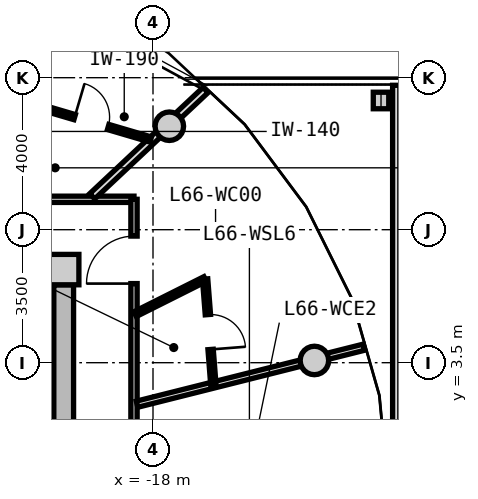
"""IFC4 building model, lengths in metres.
Left out: names, types, materials, properties, quantities, classifications, styles, units other than length and angle.
Written with IfcOpenShell. Run it as: python <this file> out.ifc"""

import sys

from ifc_helpers import new_model, si_unit, direction, frame, frame_2d, origin, origin_2d, place, context, subcontext, project, spatial, rectangle, circle, i_section, extrude, source, transform, mapped, element, fill, save


model = new_model("IFC4")
c1 = context("Model", 3, precision=1e-05, world=origin(), true_north=direction((0.0, 1.0)))
c2 = subcontext(c1, "Body", "Model", "MODEL_VIEW")
j1 = project(units=[si_unit("LENGTHUNIT", "METRE"), si_unit("PLANEANGLEUNIT", "RADIAN")], contexts=[c1])
p1 = place(None, origin())
s1 = spatial("IfcSite", under=j1, at=p1, CompositionType="ELEMENT")
p2 = place(p1, origin())
s2 = spatial("IfcBuilding", under=s1, at=p2, CompositionType="ELEMENT")
p3 = place(p2, frame((0.0, 0.0, 213.9)))
s3 = spatial("IfcBuildingStorey", under=s2, at=p3, CompositionType="ELEMENT", Elevation=213.9)
m1 = source(origin(), c2, "Body", "SweptSolid", [
    extrude(rectangle(XDim=0.8, YDim=0.8, at=origin_2d()), origin(), (0.0, 0.0, 1.0), 3.05),
])
p4 = place(p3, frame((-20.35, 5.95, 0.0), z_axis=(0.0, 0.0, 1.0), x_axis=(1.0, 0.0, 0.0)))
e1 = element("IfcColumn", 1, at=p4, inside=s3, PredefinedType="COLUMN", context=c2, shape_type="MappedRepresentation", body=[
    mapped(m1, transform((0.0, 0.0, 0.0), x_axis=(1.0, 0.0, 0.0), y_axis=(0.0, 1.0, 0.0), z_axis=(0.0, 0.0, 1.0), scale=1.0)),
])
m2 = source(origin(), c2, "Body", "SweptSolid", [
    extrude(rectangle(XDim=11.1, YDim=0.52, at=frame_2d((5.55, 0.0))), origin(), (0.0, 0.0, 1.0), 2.76),
])
p5 = place(p3, frame((-20.35, 5.55, 0.0), z_axis=(0.0, 0.0, 1.0), x_axis=(0.0, -1.0, 0.0)))
e2 = element("IfcWall", 2, at=p5, inside=s3, PredefinedType="SHEAR", context=c2, shape_type="MappedRepresentation", body=[
    mapped(m2, transform((0.0, 0.0, 0.0), x_axis=(1.0, 0.0, 0.0), y_axis=(0.0, 1.0, 0.0), z_axis=(0.0, 0.0, 1.0), scale=1.0)),
])
p6 = place(p5, frame((5.65, 0.0, 0.0)))
e3 = element("IfcOpeningElement", 3, at=p6, cuts=e2, PredefinedType="OPENING", context=c2, shape_type="SweptSolid", body=[
    extrude(rectangle(XDim=1.2, YDim=2.15, at=frame_2d((0.6, 1.075))), frame((0.0, 0.27, 0.0), z_axis=(0.0, -1.0, 0.0), x_axis=(1.0, 0.0, 0.0)), (0.0, 0.0, 1.0), 0.54),
])
m3 = source(origin(), c2, "Body", "SweptSolid", [
    extrude(circle(Radius=0.375, at=origin_2d()), origin(), (0.0, 0.0, 1.0), 3.05),
])
for number, where, z_axis, x_axis in (
    (4, (-13.753, 3.559, 0.0), (0.0, 0.0, 1.0), (1.0, 0.0, 0.0)),
    (5, (-17.57, 9.723, 0.0), (0.0, 0.0, 1.0), (1.0, 0.0, 0.0)),
):
    element("IfcColumn", number, at=place(p3, frame(where, z_axis=z_axis, x_axis=x_axis)), inside=s3, PredefinedType="COLUMN", context=c2, shape_type="MappedRepresentation", body=[
        mapped(m3, transform((0.0, 0.0, 0.0), x_axis=(1.0, 0.0, 0.0), y_axis=(0.0, 1.0, 0.0), z_axis=(0.0, 0.0, 1.0), scale=1.0)),
    ])
m4 = source(origin(), c2, "Body", "SweptSolid", [
    extrude(i_section(OverallWidth=0.407, OverallDepth=0.435, WebThickness=0.024, FlangeThickness=0.039, FilletRadius=0.015, at=origin_2d()), origin(), (0.0, 0.0, 1.0), 3.05),
])
p7 = place(p3, frame((-12.0, 10.4, 0.0), z_axis=(0.0, 0.0, 1.0), x_axis=(1.0, 0.0, 0.0)))
e6 = element("IfcColumn", 6, at=p7, inside=s3, PredefinedType="COLUMN", context=c2, shape_type="MappedRepresentation", body=[
    mapped(m4, transform((0.0, 0.0, 0.0), x_axis=(1.0, 0.0, 0.0), y_axis=(0.0, 1.0, 0.0), z_axis=(0.0, 0.0, 1.0), scale=1.0)),
])
m5 = source(origin(), c2, "Body", "SweptSolid", [
    extrude(rectangle(XDim=8.58, YDim=0.165, at=frame_2d((4.29, 0.0))), origin(), (0.0, 0.0, 1.0), 2.745),
])
p8 = place(p3, frame((-27.08, 7.8, 0.0), z_axis=(0.0, 0.0, 1.0), x_axis=(1.0, 0.0, 0.0)))
e7 = element("IfcWall", 7, at=p8, inside=s3, PredefinedType="PARTITIONING", context=c2, shape_type="MappedRepresentation", body=[
    mapped(m5, transform((0.0, 0.0, 0.0), x_axis=(1.0, 0.0, 0.0), y_axis=(0.0, 1.0, 0.0), z_axis=(0.0, 0.0, 1.0), scale=1.0)),
])
p9 = place(p8, frame((2.18, 0.0, 0.0)))
e8 = element("IfcOpeningElement", 8, at=p9, cuts=e7, PredefinedType="OPENING", context=c2, shape_type="SweptSolid", body=[
    extrude(rectangle(XDim=1.25, YDim=2.2, at=frame_2d((0.625, 1.1))), frame((0.0, 0.093, 0.0), z_axis=(0.0, -1.0, 0.0), x_axis=(1.0, 0.0, 0.0)), (0.0, 0.0, 1.0), 0.185),
])
m6 = source(origin(), c2, "Body", "SweptSolid", [
    extrude(rectangle(XDim=6.88, YDim=0.165, at=frame_2d((3.44, 0.0))), origin(), (0.0, 0.0, 1.0), 2.745),
])
p10 = place(p3, frame((-18.5, 7.8, 0.0), z_axis=(0.0, 0.0, 1.0), x_axis=(0.0, -1.0, 0.0)))
e9 = element("IfcWall", 9, at=p10, inside=s3, PredefinedType="PARTITIONING", context=c2, shape_type="MappedRepresentation", body=[
    mapped(m6, transform((0.0, 0.0, 0.0), x_axis=(1.0, 0.0, 0.0), y_axis=(0.0, 1.0, 0.0), z_axis=(0.0, 0.0, 1.0), scale=1.0)),
])
p11 = place(p10, frame((0.968, 0.0, 0.0)))
e10 = element("IfcOpeningElement", 10, at=p11, cuts=e9, PredefinedType="OPENING", context=c2, shape_type="SweptSolid", body=[
    extrude(rectangle(XDim=1.25, YDim=2.2, at=frame_2d((0.625, 1.1))), frame((0.0, 0.093, 0.0), z_axis=(0.0, -1.0, 0.0), x_axis=(1.0, 0.0, 0.0)), (0.0, 0.0, 1.0), 0.185),
])
m7 = source(origin(), c2, "Body", "SweptSolid", [
    extrude(rectangle(XDim=6.157, YDim=0.165, at=frame_2d((3.079, 0.0))), origin(), (0.0, 0.0, 1.0), 2.345),
])
p12 = place(p3, frame((-18.42, 2.407, 0.0), z_axis=(0.0, 0.0, 1.0), x_axis=(0.969840867184, 0.243738984038, 0.0)))
e11 = element("IfcWall", 11, at=p12, inside=s3, PredefinedType="PARTITIONING", context=c2, shape_type="MappedRepresentation", body=[
    mapped(m7, transform((0.0, 0.0, 0.0), x_axis=(1.0, 0.0, 0.0), y_axis=(0.0, 1.0, 0.0), z_axis=(0.0, 0.0, 1.0), scale=1.0)),
])
m8 = source(origin(), c2, "Body", "SweptSolid", [
    extrude(rectangle(XDim=4.089, YDim=0.19, at=frame_2d((2.044, 0.0))), origin(), (0.0, 0.0, 1.0), 2.345),
])
p13 = place(p3, frame((-19.598, 7.88, 0.0), z_axis=(0.0, 0.0, 1.0), x_axis=(0.729401273609, 0.684086092577, 0.0)))
e12 = element("IfcWall", 12, at=p13, inside=s3, PredefinedType="PARTITIONING", context=c2, shape_type="MappedRepresentation", body=[
    mapped(m8, transform((0.0, 0.0, 0.0), x_axis=(1.0, 0.0, 0.0), y_axis=(0.0, 1.0, 0.0), z_axis=(0.0, 0.0, 1.0), scale=1.0)),
])
m9 = source(origin(), c2, "Body", "SweptSolid", [
    extrude(rectangle(XDim=2.06, YDim=0.14, at=frame_2d((1.03, 0.0))), origin(), (0.0, 0.0, 1.0), 2.745),
])
p14 = place(p3, frame((-18.47, 4.778, 0.0), z_axis=(0.0, 0.0, 1.0), x_axis=(0.893952568722, 0.448161583444, 0.0)))
e13 = element("IfcWall", 13, at=p14, inside=s3, PredefinedType="PARTITIONING", context=c2, shape_type="MappedRepresentation", body=[
    mapped(m9, transform((0.0, 0.0, 0.0), x_axis=(1.0, 0.0, 0.0), y_axis=(0.0, 1.0, 0.0), z_axis=(0.0, 0.0, 1.0), scale=1.0)),
])
m10 = source(origin(), c2, "Body", "SweptSolid", [
    extrude(rectangle(XDim=2.798, YDim=0.14, at=frame_2d((1.399, 0.0))), origin(), (0.0, 0.0, 1.0), 2.745),
])
p15 = place(p3, frame((-16.629, 5.701, 0.0), z_axis=(0.0, 0.0, 1.0), x_axis=(0.077823984089, -0.996967114553, 0.0)))
e14 = element("IfcWall", 14, at=p15, inside=s3, PredefinedType="PARTITIONING", context=c2, shape_type="MappedRepresentation", body=[
    mapped(m10, transform((0.0, 0.0, 0.0), x_axis=(1.0, 0.0, 0.0), y_axis=(0.0, 1.0, 0.0), z_axis=(0.0, 0.0, 1.0), scale=1.0)),
])
p16 = place(p15, frame((0.939, 0.0, 0.0)))
e15 = element("IfcOpeningElement", 15, at=p16, cuts=e14, PredefinedType="OPENING", context=c2, shape_type="SweptSolid", body=[
    extrude(rectangle(XDim=0.92, YDim=2.1, at=frame_2d((0.46, 1.05))), frame((0.0, 0.08, 0.0), z_axis=(0.0, -1.0, 0.0), x_axis=(1.0, 0.0, 0.0)), (0.0, 0.0, 1.0), 0.16),
])
m11 = source(origin(), c2, "Body", "SweptSolid", [
    extrude(rectangle(XDim=3.252, YDim=0.14, at=frame_2d((1.626, 0.0))), origin(), (0.0, 0.0, 1.0), 2.745),
])
p17 = place(p3, frame((-21.18, 10.291, 0.0), z_axis=(0.0, 0.0, 1.0), x_axis=(0.959294945864, -0.282406102695, 0.0)))
e16 = element("IfcWall", 16, at=p17, inside=s3, PredefinedType="PARTITIONING", context=c2, shape_type="MappedRepresentation", body=[
    mapped(m11, transform((0.0, 0.0, 0.0), x_axis=(1.0, 0.0, 0.0), y_axis=(0.0, 1.0, 0.0), z_axis=(0.0, 0.0, 1.0), scale=1.0)),
])
p18 = place(p17, frame((1.166, 0.0, 0.0)))
e17 = element("IfcOpeningElement", 17, at=p18, cuts=e16, PredefinedType="OPENING", context=c2, shape_type="SweptSolid", body=[
    extrude(rectangle(XDim=0.92, YDim=2.1, at=frame_2d((0.46, 1.05))), frame((0.0, 0.08, 0.0), z_axis=(0.0, -1.0, 0.0), x_axis=(1.0, 0.0, 0.0)), (0.0, 0.0, 1.0), 0.16),
])
m12 = source(origin(), c2, "Body", "SweptSolid", [
    extrude(rectangle(XDim=9.88, YDim=0.19, at=frame_2d((4.94, 0.0))), origin(), (0.0, 0.0, 1.0), 2.745),
])
p19 = place(p3, frame((-11.6, 0.92, 0.0), z_axis=(0.0, 0.0, 1.0), x_axis=(0.0, 1.0, 0.0)))
e18 = element("IfcWall", 18, at=p19, inside=s3, PredefinedType="PARTITIONING", context=c2, shape_type="MappedRepresentation", body=[
    mapped(m12, transform((0.0, 0.0, 0.0), x_axis=(1.0, 0.0, 0.0), y_axis=(0.0, 1.0, 0.0), z_axis=(0.0, 0.0, 1.0), scale=1.0)),
])
m13 = source(origin(), c2, "Body", "SweptSolid", [
    extrude(rectangle(XDim=1.25, YDim=2.2, at=frame_2d((0.625, 1.1))), frame((0.0, 0.025, 0.0), z_axis=(0.0, -1.0, 0.0), x_axis=(1.0, 0.0, 0.0)), (0.0, 0.0, 1.0), 0.05),
])
p20 = place(p11, frame((1.25, 0.0, 0.0), z_axis=(0.0, 0.0, 1.0), x_axis=(-1.0, 0.0, 0.0)))
e19 = element("IfcDoor", 19, at=p20, inside=s3, OperationType="SINGLE_SWING_LEFT", PredefinedType="DOOR", context=c2, shape_type="MappedRepresentation", body=[
    mapped(m13, transform((0.0, 0.0, 0.0), x_axis=(1.0, 0.0, 0.0), y_axis=(0.0, 1.0, 0.0), z_axis=(0.0, 0.0, 1.0), scale=1.0)),
])
fill(e10, e19)
m14 = source(origin(), c2, "Body", "SweptSolid", [
    extrude(rectangle(XDim=0.92, YDim=2.1, at=frame_2d((0.46, 1.05))), frame((0.0, 0.025, 0.0), z_axis=(0.0, -1.0, 0.0), x_axis=(1.0, 0.0, 0.0)), (0.0, 0.0, 1.0), 0.05),
])
p21 = place(p16, origin())
e20 = element("IfcDoor", 20, at=p21, inside=s3, OperationType="SINGLE_SWING_RIGHT", PredefinedType="DOOR", context=c2, shape_type="MappedRepresentation", body=[
    mapped(m14, transform((0.0, 0.0, 0.0), x_axis=(1.0, 0.0, 0.0), y_axis=(0.0, 1.0, 0.0), z_axis=(0.0, 0.0, 1.0), scale=1.0)),
])
fill(e15, e20)
p22 = place(p18, origin())
e21 = element("IfcDoor", 21, at=p22, inside=s3, OperationType="SINGLE_SWING_LEFT", PredefinedType="DOOR", context=c2, shape_type="MappedRepresentation", body=[
    mapped(m14, transform((0.0, 0.0, 0.0), x_axis=(1.0, 0.0, 0.0), y_axis=(0.0, 1.0, 0.0), z_axis=(0.0, 0.0, 1.0), scale=1.0)),
])
fill(e17, e21)
save(model, sys.argv[1])
